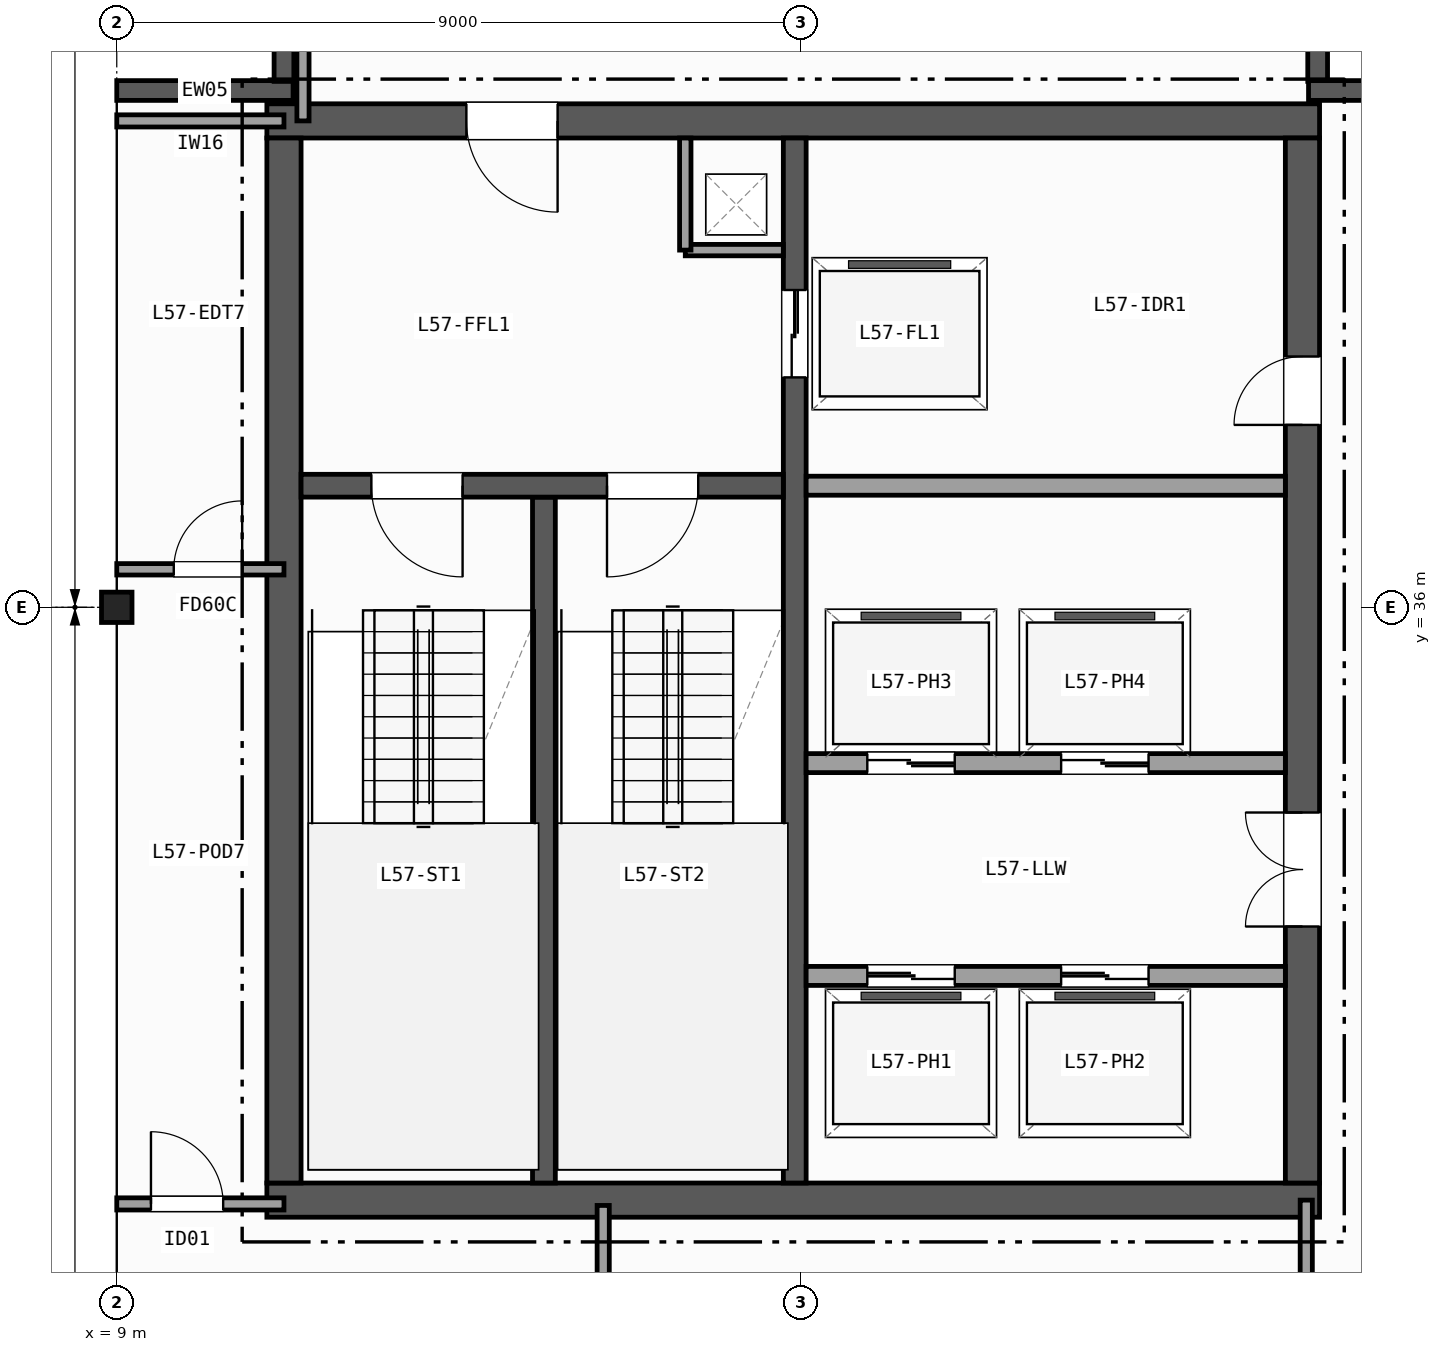
"""IFC4 building model, lengths in metres.
Left out: names, types, materials, properties, quantities, classifications, styles, units other than length and angle.
Written with IfcOpenShell. Run it as: python <this file> out.ifc"""

import sys

from ifc_helpers import new_model, si_unit, direction, frame, frame_2d, origin, origin_2d, place, context, subcontext, project, spatial, rectangle, i_section, extrude, element, fill, save


model = new_model("IFC4")
c1 = context("Model", 3, precision=1e-05, world=origin(), true_north=direction((0.0, 1.0)))
c2 = subcontext(c1, "Body", "Model", "MODEL_VIEW")
j1 = project(units=[si_unit("LENGTHUNIT", "METRE"), si_unit("PLANEANGLEUNIT", "RADIAN")], contexts=[c1])
p1 = place(None, origin())
s1 = spatial("IfcSite", under=j1, at=p1, CompositionType="ELEMENT")
p2 = place(p1, origin())
s2 = spatial("IfcBuilding", under=s1, at=p2, CompositionType="ELEMENT")
p3 = place(p2, frame((0.0, 0.0, 228.4)))
s3 = spatial("IfcBuildingStorey", under=s2, at=p3, CompositionType="ELEMENT", Elevation=228.4)
p4 = place(p3, frame((9.0, 36.0, 0.0), z_axis=(0.0, 0.0, 1.0), x_axis=(1.0, 0.0, 0.0)))
e1 = element("IfcColumn", 1, at=p4, inside=s3, PredefinedType="COLUMN", context=c2, shape_type="SweptSolid", body=[
    extrude(i_section(OverallWidth=0.401, OverallDepth=0.399, WebThickness=0.025, FlangeThickness=0.04, FilletRadius=0.015, at=origin_2d()), origin(), (0.0, 0.0, 1.0), 3.7),
])
p5 = place(p3, frame((9.0, 42.8, 0.0), z_axis=(0.0, 0.0, 1.0), x_axis=(1.0, 0.0, 0.0)))
e2 = element("IfcWall", 2, at=p5, inside=s3, PredefinedType="SOLIDWALL", context=c2, shape_type="SweptSolid", body=[
    extrude(rectangle(XDim=2.32, YDim=0.26, at=frame_2d((1.16, 0.0))), origin(), (0.0, 0.0, 1.0), 3.42),
])
for number, where, z_axis, x_axis in (
    (3, (11.2, 42.92, 0.0), (0.0, 0.0, 1.0), (0.0, 1.0, 0.0)),
    (4, (24.8, 45.0, 0.0), (0.0, 0.0, 1.0), (0.0, -1.0, 0.0)),
):
    element("IfcWall", number, at=place(p3, frame(where, z_axis=z_axis, x_axis=x_axis)), inside=s3, PredefinedType="SOLIDWALL", context=c2, shape_type="SweptSolid", body=[
        extrude(rectangle(XDim=2.08, YDim=0.26, at=frame_2d((1.04, 0.0))), origin(), (0.0, 0.0, 1.0), 3.42),
    ])
p6 = place(p3, frame((24.68, 42.8, 0.0), z_axis=(0.0, 0.0, 1.0), x_axis=(1.0, 0.0, 0.0)))
e5 = element("IfcWall", 5, at=p6, inside=s3, PredefinedType="SOLIDWALL", context=c2, shape_type="SweptSolid", body=[
    extrude(rectangle(XDim=2.32, YDim=0.26, at=frame_2d((1.16, 0.0))), origin(), (0.0, 0.0, 1.0), 3.42),
])
p7 = place(p3, frame((10.975, 28.2, 0.0), z_axis=(0.0, 0.0, 1.0), x_axis=(1.0, 0.0, 0.0)))
e6 = element("IfcWall", 6, at=p7, inside=s3, PredefinedType="SHEAR", context=c2, shape_type="SweptSolid", body=[
    extrude(rectangle(XDim=13.85, YDim=0.45, at=frame_2d((6.925, 0.0))), origin(), (0.0, 0.0, 1.0), 3.42),
])
p8 = place(p3, frame((24.825, 42.4, 0.0), z_axis=(0.0, 0.0, 1.0), x_axis=(-1.0, 0.0, 0.0)))
e7 = element("IfcWall", 7, at=p8, inside=s3, PredefinedType="SHEAR", context=c2, shape_type="SweptSolid", body=[
    extrude(rectangle(XDim=13.85, YDim=0.45, at=frame_2d((6.925, 0.0))), origin(), (0.0, 0.0, 1.0), 3.42),
])
p9 = place(p8, frame((10.025, 0.0, 0.0)))
e8 = element("IfcOpeningElement", 8, at=p9, cuts=e7, PredefinedType="OPENING", context=c2, shape_type="SweptSolid", body=[
    extrude(rectangle(XDim=1.2, YDim=2.15, at=frame_2d((0.6, 1.075))), frame((0.0, 0.235, 0.0), z_axis=(0.0, -1.0, 0.0), x_axis=(1.0, 0.0, 0.0)), (0.0, 0.0, 1.0), 0.47),
])
p10 = place(p3, frame((11.2, 42.175, 0.0), z_axis=(0.0, 0.0, 1.0), x_axis=(0.0, -1.0, 0.0)))
e9 = element("IfcWall", 9, at=p10, inside=s3, PredefinedType="SHEAR", context=c2, shape_type="SweptSolid", body=[
    extrude(rectangle(XDim=13.75, YDim=0.45, at=frame_2d((6.875, 0.0))), origin(), (0.0, 0.0, 1.0), 3.42),
])
p11 = place(p3, frame((24.6, 28.425, 0.0), z_axis=(0.0, 0.0, 1.0), x_axis=(0.0, 1.0, 0.0)))
e10 = element("IfcWall", 10, at=p11, inside=s3, PredefinedType="SHEAR", context=c2, shape_type="SweptSolid", body=[
    extrude(rectangle(XDim=13.75, YDim=0.45, at=frame_2d((6.875, 0.0))), origin(), (0.0, 0.0, 1.0), 3.42),
])
p12 = place(p11, frame((3.375, 0.0, 0.0)))
e11 = element("IfcOpeningElement", 11, at=p12, cuts=e10, PredefinedType="OPENING", context=c2, shape_type="SweptSolid", body=[
    extrude(rectangle(XDim=1.5, YDim=2.2, at=frame_2d((0.75, 1.1))), frame((0.0, 0.235, 0.0), z_axis=(0.0, -1.0, 0.0), x_axis=(1.0, 0.0, 0.0)), (0.0, 0.0, 1.0), 0.47),
])
p13 = place(p11, frame((9.975, 0.0, 0.0)))
e12 = element("IfcOpeningElement", 12, at=p13, cuts=e10, PredefinedType="OPENING", context=c2, shape_type="SweptSolid", body=[
    extrude(rectangle(XDim=0.9, YDim=2.1, at=frame_2d((0.45, 1.05))), frame((0.0, 0.235, 0.0), z_axis=(0.0, -1.0, 0.0), x_axis=(1.0, 0.0, 0.0)), (0.0, 0.0, 1.0), 0.47),
])
p14 = place(p3, frame((14.62, 28.425, 0.0), z_axis=(0.0, 0.0, 1.0), x_axis=(0.0, 1.0, 0.0)))
e13 = element("IfcWall", 13, at=p14, inside=s3, PredefinedType="SHEAR", context=c2, shape_type="SweptSolid", body=[
    extrude(rectangle(XDim=9.025, YDim=0.3, at=frame_2d((4.512, 0.0))), origin(), (0.0, 0.0, 1.0), 3.42),
])
p15 = place(p3, frame((17.92, 42.175, 0.0), z_axis=(0.0, 0.0, 1.0), x_axis=(0.0, -1.0, 0.0)))
e14 = element("IfcWall", 14, at=p15, inside=s3, PredefinedType="SHEAR", context=c2, shape_type="SweptSolid", body=[
    extrude(rectangle(XDim=13.75, YDim=0.3, at=frame_2d((6.875, 0.0))), origin(), (0.0, 0.0, 1.0), 3.42),
])
p16 = place(p15, frame((2.0, 0.0, 0.0)))
e15 = element("IfcOpeningElement", 15, at=p16, cuts=e14, PredefinedType="OPENING", context=c2, shape_type="SweptSolid", body=[
    extrude(rectangle(XDim=1.15, YDim=2.15, at=frame_2d((0.575, 1.075))), frame((0.0, 0.16, 0.0), z_axis=(0.0, -1.0, 0.0), x_axis=(1.0, 0.0, 0.0)), (0.0, 0.0, 1.0), 0.32),
])
p17 = place(p3, frame((17.77, 37.6, 0.0), z_axis=(0.0, 0.0, 1.0), x_axis=(-1.0, 0.0, 0.0)))
e16 = element("IfcWall", 16, at=p17, inside=s3, PredefinedType="SHEAR", context=c2, shape_type="SweptSolid", body=[
    extrude(rectangle(XDim=6.345, YDim=0.3, at=frame_2d((3.172, 0.0))), origin(), (0.0, 0.0, 1.0), 3.42),
])
p18 = place(p17, frame((4.22, 0.0, 0.0)))
e17 = element("IfcOpeningElement", 17, at=p18, cuts=e16, PredefinedType="OPENING", context=c2, shape_type="SweptSolid", body=[
    extrude(rectangle(XDim=1.2, YDim=2.15, at=frame_2d((0.6, 1.075))), frame((0.0, 0.16, 0.0), z_axis=(0.0, -1.0, 0.0), x_axis=(1.0, 0.0, 0.0)), (0.0, 0.0, 1.0), 0.32),
])
p19 = place(p17, frame((1.12, 0.0, 0.0)))
e18 = element("IfcOpeningElement", 18, at=p19, cuts=e16, PredefinedType="OPENING", context=c2, shape_type="SweptSolid", body=[
    extrude(rectangle(XDim=1.2, YDim=2.15, at=frame_2d((0.6, 1.075))), frame((0.0, 0.16, 0.0), z_axis=(0.0, -1.0, 0.0), x_axis=(1.0, 0.0, 0.0)), (0.0, 0.0, 1.0), 0.32),
])
p20 = place(p3, frame((16.48, 40.7, 0.0), z_axis=(0.0, 0.0, 1.0), x_axis=(1.0, 0.0, 0.0)))
e19 = element("IfcWall", 19, at=p20, inside=s3, PredefinedType="PARTITIONING", context=c2, shape_type="SweptSolid", body=[
    extrude(rectangle(XDim=1.29, YDim=0.15, at=frame_2d((0.645, 0.0))), origin(), (0.0, 0.0, 1.0), 3.42),
])
p21 = place(p3, frame((16.48, 40.7, 0.0), z_axis=(0.0, 0.0, 1.0), x_axis=(0.0, 1.0, 0.0)))
e20 = element("IfcWall", 20, at=p21, inside=s3, PredefinedType="PARTITIONING", context=c2, shape_type="SweptSolid", body=[
    extrude(rectangle(XDim=1.475, YDim=0.15, at=frame_2d((0.738, 0.0))), origin(), (0.0, 0.0, 1.0), 3.42),
])
p22 = place(p3, frame((18.07, 37.6, 0.0), z_axis=(0.0, 0.0, 1.0), x_axis=(1.0, 0.0, 0.0)))
e21 = element("IfcWall", 21, at=p22, inside=s3, PredefinedType="PARTITIONING", context=c2, shape_type="SweptSolid", body=[
    extrude(rectangle(XDim=6.305, YDim=0.25, at=frame_2d((3.152, 0.0))), origin(), (0.0, 0.0, 1.0), 3.42),
])
p23 = place(p3, frame((18.07, 31.15, 0.0), z_axis=(0.0, 0.0, 1.0), x_axis=(1.0, 0.0, 0.0)))
e22 = element("IfcWall", 22, at=p23, inside=s3, PredefinedType="PARTITIONING", context=c2, shape_type="SweptSolid", body=[
    extrude(rectangle(XDim=6.305, YDim=0.25, at=frame_2d((3.152, 0.0))), origin(), (0.0, 0.0, 1.0), 3.42),
])
p24 = place(p23, frame((0.805, 0.0, 0.0)))
e23 = element("IfcOpeningElement", 23, at=p24, cuts=e22, PredefinedType="OPENING", context=c2, shape_type="SweptSolid", body=[
    extrude(rectangle(XDim=1.15, YDim=2.15, at=frame_2d((0.575, 1.075))), frame((0.0, 0.135, 0.0), z_axis=(0.0, -1.0, 0.0), x_axis=(1.0, 0.0, 0.0)), (0.0, 0.0, 1.0), 0.27),
])
p25 = place(p23, frame((3.355, 0.0, 0.0)))
e24 = element("IfcOpeningElement", 24, at=p25, cuts=e22, PredefinedType="OPENING", context=c2, shape_type="SweptSolid", body=[
    extrude(rectangle(XDim=1.15, YDim=2.15, at=frame_2d((0.575, 1.075))), frame((0.0, 0.135, 0.0), z_axis=(0.0, -1.0, 0.0), x_axis=(1.0, 0.0, 0.0)), (0.0, 0.0, 1.0), 0.27),
])
p26 = place(p3, frame((24.375, 33.95, 0.0), z_axis=(0.0, 0.0, 1.0), x_axis=(-1.0, 0.0, 0.0)))
e25 = element("IfcWall", 25, at=p26, inside=s3, PredefinedType="PARTITIONING", context=c2, shape_type="SweptSolid", body=[
    extrude(rectangle(XDim=6.305, YDim=0.25, at=frame_2d((3.152, 0.0))), origin(), (0.0, 0.0, 1.0), 3.42),
])
p27 = place(p26, frame((4.35, 0.0, 0.0)))
e26 = element("IfcOpeningElement", 26, at=p27, cuts=e25, PredefinedType="OPENING", context=c2, shape_type="SweptSolid", body=[
    extrude(rectangle(XDim=1.15, YDim=2.15, at=frame_2d((0.575, 1.075))), frame((0.0, 0.135, 0.0), z_axis=(0.0, -1.0, 0.0), x_axis=(1.0, 0.0, 0.0)), (0.0, 0.0, 1.0), 0.27),
])
p28 = place(p26, frame((1.8, 0.0, 0.0)))
e27 = element("IfcOpeningElement", 27, at=p28, cuts=e25, PredefinedType="OPENING", context=c2, shape_type="SweptSolid", body=[
    extrude(rectangle(XDim=1.15, YDim=2.15, at=frame_2d((0.575, 1.075))), frame((0.0, 0.135, 0.0), z_axis=(0.0, -1.0, 0.0), x_axis=(1.0, 0.0, 0.0)), (0.0, 0.0, 1.0), 0.27),
])
p29 = place(p3, frame((9.0, 28.15, 0.0), z_axis=(0.0, 0.0, 1.0), x_axis=(1.0, 0.0, 0.0)))
e28 = element("IfcWall", 28, at=p29, inside=s3, PredefinedType="PARTITIONING", context=c2, shape_type="SweptSolid", body=[
    extrude(rectangle(XDim=2.2, YDim=0.16, at=frame_2d((1.1, 0.0))), origin(), (0.0, 0.0, 1.0), 2.707),
])
p30 = place(p29, frame((0.45, 0.0, 0.0)))
e29 = element("IfcOpeningElement", 29, at=p30, cuts=e28, PredefinedType="OPENING", context=c2, shape_type="SweptSolid", body=[
    extrude(rectangle(XDim=0.95, YDim=2.1, at=frame_2d((0.475, 1.05))), frame((0.0, 0.09, 0.0), z_axis=(0.0, -1.0, 0.0), x_axis=(1.0, 0.0, 0.0)), (0.0, 0.0, 1.0), 0.18),
])
p31 = place(p3, frame((9.0, 42.4, 0.0), z_axis=(0.0, 0.0, 1.0), x_axis=(1.0, 0.0, 0.0)))
e30 = element("IfcWall", 30, at=p31, inside=s3, PredefinedType="PARTITIONING", context=c2, shape_type="SweptSolid", body=[
    extrude(rectangle(XDim=2.2, YDim=0.16, at=frame_2d((1.1, 0.0))), origin(), (0.0, 0.0, 1.0), 3.42),
])
p32 = place(p3, frame((11.45, 42.4, 0.0), z_axis=(0.0, 0.0, 1.0), x_axis=(0.0, 1.0, 0.0)))
e31 = element("IfcWall", 31, at=p32, inside=s3, PredefinedType="PARTITIONING", context=c2, shape_type="SweptSolid", body=[
    extrude(rectangle(XDim=2.666, YDim=0.16, at=frame_2d((1.333, 0.0))), origin(), (0.0, 0.0, 1.0), 3.42),
])
p33 = place(p3, frame((9.0, 36.5, 0.0), z_axis=(0.0, 0.0, 1.0), x_axis=(1.0, 0.0, 0.0)))
e32 = element("IfcWall", 32, at=p33, inside=s3, PredefinedType="PARTITIONING", context=c2, shape_type="SweptSolid", body=[
    extrude(rectangle(XDim=2.2, YDim=0.15, at=frame_2d((1.1, 0.0))), origin(), (0.0, 0.0, 1.0), 3.42),
])
p34 = place(p33, frame((0.75, 0.0, 0.0)))
e33 = element("IfcOpeningElement", 33, at=p34, cuts=e32, PredefinedType="OPENING", context=c2, shape_type="SweptSolid", body=[
    extrude(rectangle(XDim=0.9, YDim=2.1, at=frame_2d((0.45, 1.05))), frame((0.0, 0.085, 0.0), z_axis=(0.0, -1.0, 0.0), x_axis=(1.0, 0.0, 0.0)), (0.0, 0.0, 1.0), 0.17),
])
p35 = place(p3, frame((24.65, 9.0, 0.0), z_axis=(0.0, 0.0, 1.0), x_axis=(0.0, 1.0, 0.0)))
e34 = element("IfcWall", 34, at=p35, inside=s3, PredefinedType="PARTITIONING", context=c2, shape_type="SweptSolid", body=[
    extrude(rectangle(XDim=19.2, YDim=0.16, at=frame_2d((9.6, 0.0))), origin(), (0.0, 0.0, 1.0), 2.707),
])
p36 = place(p35, frame((12.2, 0.0, 0.0)))
e35 = element("IfcOpeningElement", 35, at=p36, cuts=e34, PredefinedType="OPENING", context=c2, shape_type="SweptSolid", body=[
    extrude(rectangle(XDim=1.05, YDim=2.15, at=frame_2d((0.525, 1.075))), frame((0.0, 0.09, 0.0), z_axis=(0.0, -1.0, 0.0), x_axis=(1.0, 0.0, 0.0)), (0.0, 0.0, 1.0), 0.18),
])
p37 = place(p35, frame((4.2, 0.0, 0.0)))
e36 = element("IfcOpeningElement", 36, at=p37, cuts=e34, PredefinedType="OPENING", context=c2, shape_type="SweptSolid", body=[
    extrude(rectangle(XDim=1.2, YDim=2.15, at=frame_2d((0.6, 1.075))), frame((0.0, 0.09, 0.0), z_axis=(0.0, -1.0, 0.0), x_axis=(1.0, 0.0, 0.0)), (0.0, 0.0, 1.0), 0.18),
])
p38 = place(p3, frame((15.4, 18.0, 0.0), z_axis=(0.0, 0.0, 1.0), x_axis=(0.0, 1.0, 0.0)))
e37 = element("IfcWall", 37, at=p38, inside=s3, PredefinedType="PARTITIONING", context=c2, shape_type="SweptSolid", body=[
    extrude(rectangle(XDim=10.13, YDim=0.16, at=frame_2d((5.065, 0.0))), origin(), (0.0, 0.0, 1.0), 2.789),
])
p39 = place(p38, frame((2.5, 0.0, 0.0)))
e38 = element("IfcOpeningElement", 38, at=p39, cuts=e37, PredefinedType="OPENING", context=c2, shape_type="SweptSolid", body=[
    extrude(rectangle(XDim=0.86, YDim=2.05, at=frame_2d((0.43, 1.025))), frame((0.0, 0.09, 0.0), z_axis=(0.0, -1.0, 0.0), x_axis=(1.0, 0.0, 0.0)), (0.0, 0.0, 1.0), 0.18),
])
p40 = place(p18, origin())
e39 = element("IfcDoor", 39, at=p40, inside=s3, OperationType="SINGLE_SWING_LEFT", PredefinedType="DOOR", context=c2, shape_type="SweptSolid", body=[
    extrude(rectangle(XDim=1.2, YDim=2.15, at=frame_2d((0.6, 1.075))), frame((0.0, 0.025, 0.0), z_axis=(0.0, -1.0, 0.0), x_axis=(1.0, 0.0, 0.0)), (0.0, 0.0, 1.0), 0.05),
])
fill(e17, e39)
p41 = place(p19, origin())
e40 = element("IfcDoor", 40, at=p41, inside=s3, OperationType="SINGLE_SWING_RIGHT", PredefinedType="DOOR", context=c2, shape_type="SweptSolid", body=[
    extrude(rectangle(XDim=1.2, YDim=2.15, at=frame_2d((0.6, 1.075))), frame((0.0, 0.025, 0.0), z_axis=(0.0, -1.0, 0.0), x_axis=(1.0, 0.0, 0.0)), (0.0, 0.0, 1.0), 0.05),
])
fill(e18, e40)
p42 = place(p12, origin())
e41 = element("IfcDoor", 41, at=p42, inside=s3, OperationType="DOUBLE_DOOR_SINGLE_SWING", PredefinedType="DOOR", context=c2, shape_type="SweptSolid", body=[
    extrude(rectangle(XDim=1.5, YDim=2.2, at=frame_2d((0.75, 1.1))), frame((0.0, 0.025, 0.0), z_axis=(0.0, -1.0, 0.0), x_axis=(1.0, 0.0, 0.0)), (0.0, 0.0, 1.0), 0.05),
])
fill(e11, e41)
p43 = place(p9, origin())
e42 = element("IfcDoor", 42, at=p43, inside=s3, OperationType="SINGLE_SWING_LEFT", PredefinedType="DOOR", context=c2, shape_type="SweptSolid", body=[
    extrude(rectangle(XDim=1.2, YDim=2.15, at=frame_2d((0.6, 1.075))), frame((0.0, 0.025, 0.0), z_axis=(0.0, -1.0, 0.0), x_axis=(1.0, 0.0, 0.0)), (0.0, 0.0, 1.0), 0.05),
])
fill(e8, e42)
p44 = place(p13, origin())
e43 = element("IfcDoor", 43, at=p44, inside=s3, OperationType="SINGLE_SWING_LEFT", PredefinedType="DOOR", context=c2, shape_type="SweptSolid", body=[
    extrude(rectangle(XDim=0.9, YDim=2.1, at=frame_2d((0.45, 1.05))), frame((0.0, 0.025, 0.0), z_axis=(0.0, -1.0, 0.0), x_axis=(1.0, 0.0, 0.0)), (0.0, 0.0, 1.0), 0.05),
])
fill(e12, e43)
p45 = place(p16, origin())
e44 = element("IfcDoor", 44, at=p45, inside=s3, OperationType="DOUBLE_DOOR_SLIDING", PredefinedType="DOOR", context=c2, shape_type="SweptSolid", body=[
    extrude(rectangle(XDim=1.15, YDim=2.15, at=frame_2d((0.575, 1.075))), frame((0.0, 0.025, 0.0), z_axis=(0.0, -1.0, 0.0), x_axis=(1.0, 0.0, 0.0)), (0.0, 0.0, 1.0), 0.05),
])
fill(e15, e44)
p46 = place(p24, origin())
e45 = element("IfcDoor", 45, at=p46, inside=s3, OperationType="DOUBLE_DOOR_SLIDING", PredefinedType="DOOR", context=c2, shape_type="SweptSolid", body=[
    extrude(rectangle(XDim=1.15, YDim=2.15, at=frame_2d((0.575, 1.075))), frame((0.0, 0.025, 0.0), z_axis=(0.0, -1.0, 0.0), x_axis=(1.0, 0.0, 0.0)), (0.0, 0.0, 1.0), 0.05),
])
fill(e23, e45)
p47 = place(p25, origin())
e46 = element("IfcDoor", 46, at=p47, inside=s3, OperationType="DOUBLE_DOOR_SLIDING", PredefinedType="DOOR", context=c2, shape_type="SweptSolid", body=[
    extrude(rectangle(XDim=1.15, YDim=2.15, at=frame_2d((0.575, 1.075))), frame((0.0, 0.025, 0.0), z_axis=(0.0, -1.0, 0.0), x_axis=(1.0, 0.0, 0.0)), (0.0, 0.0, 1.0), 0.05),
])
fill(e24, e46)
p48 = place(p27, origin())
e47 = element("IfcDoor", 47, at=p48, inside=s3, OperationType="DOUBLE_DOOR_SLIDING", PredefinedType="DOOR", context=c2, shape_type="SweptSolid", body=[
    extrude(rectangle(XDim=1.15, YDim=2.15, at=frame_2d((0.575, 1.075))), frame((0.0, 0.025, 0.0), z_axis=(0.0, -1.0, 0.0), x_axis=(1.0, 0.0, 0.0)), (0.0, 0.0, 1.0), 0.05),
])
fill(e26, e47)
p49 = place(p28, origin())
e48 = element("IfcDoor", 48, at=p49, inside=s3, OperationType="DOUBLE_DOOR_SLIDING", PredefinedType="DOOR", context=c2, shape_type="SweptSolid", body=[
    extrude(rectangle(XDim=1.15, YDim=2.15, at=frame_2d((0.575, 1.075))), frame((0.0, 0.025, 0.0), z_axis=(0.0, -1.0, 0.0), x_axis=(1.0, 0.0, 0.0)), (0.0, 0.0, 1.0), 0.05),
])
fill(e27, e48)
p50 = place(p30, origin())
e49 = element("IfcDoor", 49, at=p50, inside=s3, OperationType="SINGLE_SWING_LEFT", PredefinedType="DOOR", context=c2, shape_type="SweptSolid", body=[
    extrude(rectangle(XDim=0.95, YDim=2.1, at=frame_2d((0.475, 1.05))), frame((0.0, 0.025, 0.0), z_axis=(0.0, -1.0, 0.0), x_axis=(1.0, 0.0, 0.0)), (0.0, 0.0, 1.0), 0.05),
])
fill(e29, e49)
p51 = place(p34, origin())
e50 = element("IfcDoor", 50, at=p51, inside=s3, OperationType="SINGLE_SWING_RIGHT", PredefinedType="DOOR", context=c2, shape_type="SweptSolid", body=[
    extrude(rectangle(XDim=0.9, YDim=2.1, at=frame_2d((0.45, 1.05))), frame((0.0, 0.025, 0.0), z_axis=(0.0, -1.0, 0.0), x_axis=(1.0, 0.0, 0.0)), (0.0, 0.0, 1.0), 0.05),
])
fill(e33, e50)
save(model, sys.argv[1])
